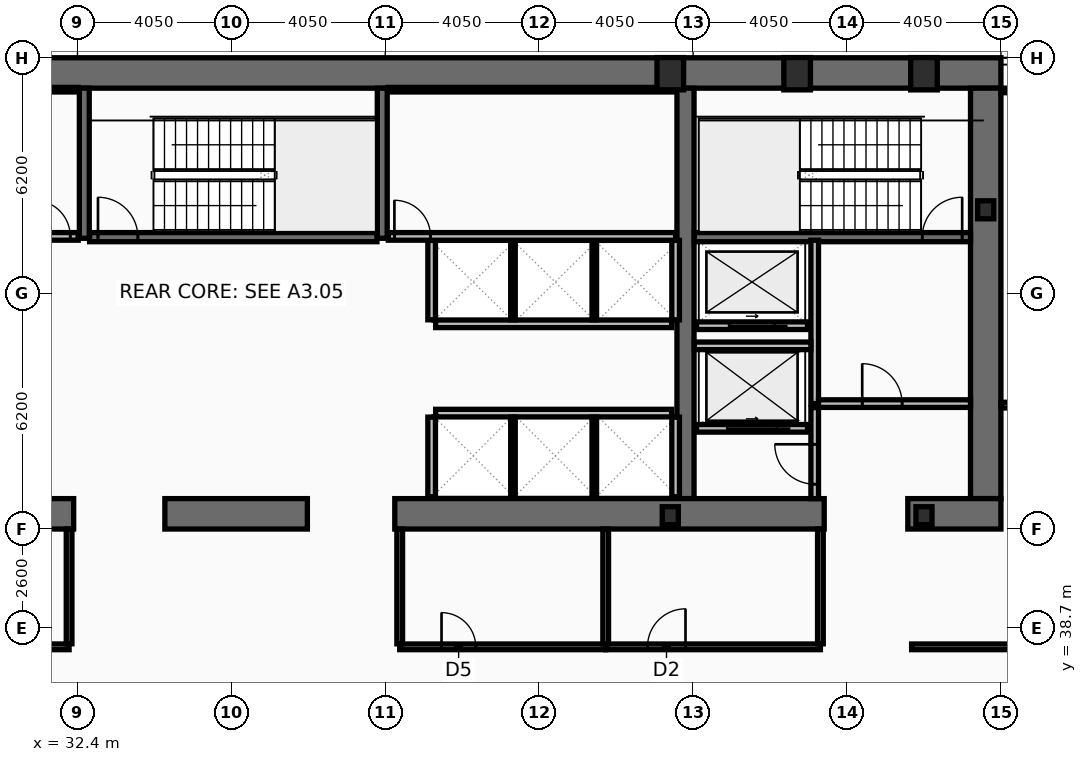
"""IFC4 building model, lengths in metres.
Left out: names, types, materials, properties, quantities, classifications, styles, units other than length and angle.
Written with IfcOpenShell. Run it as: python <this file> out.ifc"""

import sys

from ifc_helpers import new_model, si_unit, direction, frame, frame_2d, origin, origin_2d, place, context, subcontext, project, spatial, rectangle, hollow_rectangle, i_section, extrude, element, fill, save


model = new_model("IFC4")
c1 = context("Model", 3, precision=1e-05, world=origin(), true_north=direction((0.0, 1.0)))
c2 = subcontext(c1, "Body", "Model", "MODEL_VIEW")
j1 = project(units=[si_unit("LENGTHUNIT", "METRE"), si_unit("PLANEANGLEUNIT", "RADIAN")], contexts=[c1])
p1 = place(None, origin())
s1 = spatial("IfcSite", under=j1, at=p1, CompositionType="ELEMENT")
p2 = place(p1, origin())
s2 = spatial("IfcBuilding", under=s1, at=p2, CompositionType="ELEMENT")
p3 = place(p2, frame((0.0, 0.0, 81.8)))
s3 = spatial("IfcBuildingStorey", under=s2, at=p3, CompositionType="ELEMENT", Elevation=81.8)
p4 = place(p3, frame((16.2, 53.3, 0.0), z_axis=(0.0, 0.0, 1.0), x_axis=(1.0, 0.0, 0.0)))
e1 = element("IfcWall", 1, at=p4, inside=s3, PredefinedType="SHEAR", context=c2, shape_type="SweptSolid", body=[
    extrude(rectangle(XDim=40.5, YDim=0.8, at=frame_2d((20.25, 0.0))), origin(), (0.0, 0.0, 1.0), 3.78),
])
p5 = place(p3, frame((56.3, 52.9, 0.0), z_axis=(0.0, 0.0, 1.0), x_axis=(0.0, -1.0, 0.0)))
e2 = element("IfcWall", 2, at=p5, inside=s3, PredefinedType="SHEAR", context=c2, shape_type="SweptSolid", body=[
    extrude(rectangle(XDim=10.8, YDim=0.8, at=frame_2d((5.4, 0.0))), origin(), (0.0, 0.0, 1.0), 3.78),
])
p6 = place(p3, frame((48.4, 42.1, 0.0), z_axis=(0.0, 0.0, 1.0), x_axis=(0.0, 1.0, 0.0)))
e3 = element("IfcWall", 3, at=p6, inside=s3, PredefinedType="SHEAR", context=c2, shape_type="SweptSolid", body=[
    extrude(rectangle(XDim=10.8, YDim=0.45, at=frame_2d((5.4, 0.0))), origin(), (0.0, 0.0, 1.0), 3.78),
])
p7 = place(p3, frame((32.3, 41.7, 0.0), z_axis=(0.0, 0.0, 1.0), x_axis=(-1.0, 0.0, 0.0)))
e4 = element("IfcWall", 4, at=p7, inside=s3, PredefinedType="SHEAR", context=c2, shape_type="SweptSolid", body=[
    extrude(rectangle(XDim=11.45, YDim=0.8, at=frame_2d((5.725, 0.0))), origin(), (0.0, 0.0, 1.0), 3.78),
])
p8 = place(p3, frame((38.45, 41.7, 0.0), z_axis=(0.0, 0.0, 1.0), x_axis=(-1.0, 0.0, 0.0)))
e5 = element("IfcWall", 5, at=p8, inside=s3, PredefinedType="SHEAR", context=c2, shape_type="SweptSolid", body=[
    extrude(rectangle(XDim=3.75, YDim=0.8, at=frame_2d((1.875, 0.0))), origin(), (0.0, 0.0, 1.0), 3.78),
])
p9 = place(p3, frame((52.05, 41.7, 0.0), z_axis=(0.0, 0.0, 1.0), x_axis=(-1.0, 0.0, 0.0)))
e6 = element("IfcWall", 6, at=p9, inside=s3, PredefinedType="SHEAR", context=c2, shape_type="SweptSolid", body=[
    extrude(rectangle(XDim=11.3, YDim=0.8, at=frame_2d((5.65, 0.0))), origin(), (0.0, 0.0, 1.0), 3.78),
])
p10 = place(p3, frame((56.7, 41.7, 0.0), z_axis=(0.0, 0.0, 1.0), x_axis=(-1.0, 0.0, 0.0)))
e7 = element("IfcWall", 7, at=p10, inside=s3, PredefinedType="SHEAR", context=c2, shape_type="SweptSolid", body=[
    extrude(rectangle(XDim=2.45, YDim=0.8, at=frame_2d((1.225, 0.0))), origin(), (0.0, 0.0, 1.0), 3.78),
])
for number, where, z_axis, x_axis in (
    (8, (32.58, 48.95, 0.0), (0.0, 0.0, 1.0), (0.0, 1.0, 0.0)),
    (9, (40.42, 48.95, 0.0), (0.0, 0.0, 1.0), (0.0, 1.0, 0.0)),
):
    element("IfcWall", number, at=place(p3, frame(where, z_axis=z_axis, x_axis=x_axis)), inside=s3, PredefinedType="SHEAR", context=c2, shape_type="SweptSolid", body=[
        extrude(rectangle(XDim=3.95, YDim=0.26, at=frame_2d((1.975, 0.0))), origin(), (0.0, 0.0, 1.0), 3.78),
    ])
p11 = place(p3, frame((48.63, 48.98, 0.0), z_axis=(0.0, 0.0, 1.0), x_axis=(1.0, 0.0, 0.0)))
e10 = element("IfcWall", 10, at=p11, inside=s3, PredefinedType="SHEAR", context=c2, shape_type="SweptSolid", body=[
    extrude(rectangle(XDim=7.27, YDim=0.24, at=frame_2d((3.635, 0.0))), origin(), (0.0, 0.0, 1.0), 3.78),
])
p12 = place(p11, frame((6.0, 0.0, 0.0)))
e11 = element("IfcOpeningElement", 11, at=p12, cuts=e10, PredefinedType="OPENING", context=c2, shape_type="SweptSolid", body=[
    extrude(rectangle(XDim=1.05, YDim=2.15, at=frame_2d((0.525, 1.075))), frame((0.0, 0.13, 0.0), z_axis=(0.0, -1.0, 0.0), x_axis=(1.0, 0.0, 0.0)), (0.0, 0.0, 1.0), 0.26),
])
p13 = place(p3, frame((32.72, 48.98, 0.0), z_axis=(0.0, 0.0, 1.0), x_axis=(1.0, 0.0, 0.0)))
e12 = element("IfcWall", 12, at=p13, inside=s3, PredefinedType="SHEAR", context=c2, shape_type="SweptSolid", body=[
    extrude(rectangle(XDim=7.56, YDim=0.24, at=frame_2d((3.78, 0.0))), origin(), (0.0, 0.0, 1.0), 3.78),
])
p14 = place(p13, frame((0.22, 0.0, 0.0)))
e13 = element("IfcOpeningElement", 13, at=p14, cuts=e12, PredefinedType="OPENING", context=c2, shape_type="SweptSolid", body=[
    extrude(rectangle(XDim=1.05, YDim=2.15, at=frame_2d((0.525, 1.075))), frame((0.0, 0.13, 0.0), z_axis=(0.0, -1.0, 0.0), x_axis=(1.0, 0.0, 0.0)), (0.0, 0.0, 1.0), 0.26),
])
for number, where, z_axis, x_axis in (
    (14, (48.0, 53.28, 0.0), (0.0, 0.0, 1.0), (1.0, 0.0, 0.0)),
    (15, (51.337, 53.28, 0.0), (0.0, 0.0, 1.0), (1.0, 0.0, 0.0)),
    (16, (54.675, 53.28, 0.0), (0.0, 0.0, 1.0), (1.0, 0.0, 0.0)),
):
    element("IfcColumn", number, at=place(p3, frame(where, z_axis=z_axis, x_axis=x_axis)), inside=s3, PredefinedType="COLUMN", context=c2, shape_type="SweptSolid", body=[
        extrude(hollow_rectangle(XDim=0.7, YDim=0.85, WallThickness=0.05, at=origin_2d()), origin(), (0.0, 0.0, 1.0), 4.0),
    ])
for number, where, z_axis, x_axis in (
    (17, (56.3, 49.7, 0.0), (0.0, 0.0, 1.0), (1.0, 0.0, 0.0)),
    (18, (48.0, 41.65, 0.0), (0.0, 0.0, 1.0), (1.0, 0.0, 0.0)),
    (19, (54.675, 41.65, 0.0), (0.0, 0.0, 1.0), (1.0, 0.0, 0.0)),
):
    element("IfcColumn", number, at=place(p3, frame(where, z_axis=z_axis, x_axis=x_axis)), inside=s3, PredefinedType="COLUMN", context=c2, shape_type="SweptSolid", body=[
        extrude(i_section(OverallWidth=0.424, OverallDepth=0.474, WebThickness=0.048, FlangeThickness=0.077, at=origin_2d()), origin(), (0.0, 0.0, 1.0), 4.0),
    ])
p15 = place(p3, frame((51.61, 43.95, 0.0), z_axis=(0.0, 0.0, 1.0), x_axis=(-1.0, 0.0, 0.0)))
e20 = element("IfcWall", 20, at=p15, inside=s3, PredefinedType="PARTITIONING", context=c2, shape_type="SweptSolid", body=[
    extrude(rectangle(XDim=2.92, YDim=0.2, at=frame_2d((1.46, 0.0))), origin(), (0.0, 0.0, 1.0), 3.78),
])
p16 = place(p15, frame((0.81, 0.0, 0.0)))
e21 = element("IfcOpeningElement", 21, at=p16, cuts=e20, PredefinedType="OPENING", context=c2, shape_type="SweptSolid", body=[
    extrude(rectangle(XDim=1.3, YDim=2.18, at=frame_2d((0.65, 1.09))), frame((0.0, 0.11, 0.0), z_axis=(0.0, -1.0, 0.0), x_axis=(1.0, 0.0, 0.0)), (0.0, 0.0, 1.0), 0.22),
])
p17 = place(p3, frame((51.61, 46.65, 0.0), z_axis=(0.0, 0.0, 1.0), x_axis=(-1.0, 0.0, 0.0)))
e22 = element("IfcWall", 22, at=p17, inside=s3, PredefinedType="PARTITIONING", context=c2, shape_type="SweptSolid", body=[
    extrude(rectangle(XDim=2.92, YDim=0.2, at=frame_2d((1.46, 0.0))), origin(), (0.0, 0.0, 1.0), 3.78),
])
p18 = place(p17, frame((0.86, 0.0, 0.0)))
e23 = element("IfcOpeningElement", 23, at=p18, cuts=e22, PredefinedType="OPENING", context=c2, shape_type="SweptSolid", body=[
    extrude(rectangle(XDim=1.2, YDim=2.18, at=frame_2d((0.6, 1.09))), frame((0.0, 0.11, 0.0), z_axis=(0.0, -1.0, 0.0), x_axis=(1.0, 0.0, 0.0)), (0.0, 0.0, 1.0), 0.22),
])
p19 = place(p3, frame((51.8, 44.6, 0.0), z_axis=(0.0, 0.0, 1.0), x_axis=(0.0, 1.0, 0.0)))
e24 = element("IfcWall", 24, at=p19, inside=s3, PredefinedType="PARTITIONING", context=c2, shape_type="SweptSolid", body=[
    extrude(rectangle(XDim=4.3, YDim=0.2, at=frame_2d((2.15, 0.0))), origin(), (0.0, 0.0, 1.0), 3.78),
])
p20 = place(p3, frame((51.9, 44.6, 0.0), z_axis=(0.0, 0.0, 1.0), x_axis=(1.0, 0.0, 0.0)))
e25 = element("IfcWall", 25, at=p20, inside=s3, PredefinedType="PARTITIONING", context=c2, shape_type="SweptSolid", body=[
    extrude(rectangle(XDim=4.0, YDim=0.2, at=frame_2d((2.0, 0.0))), origin(), (0.0, 0.0, 1.0), 3.78),
])
p21 = place(p20, frame((1.15, 0.0, 0.0)))
e26 = element("IfcOpeningElement", 26, at=p21, cuts=e25, PredefinedType="OPENING", context=c2, shape_type="SweptSolid", body=[
    extrude(rectangle(XDim=1.05, YDim=2.15, at=frame_2d((0.525, 1.075))), frame((0.0, 0.11, 0.0), z_axis=(0.0, -1.0, 0.0), x_axis=(1.0, 0.0, 0.0)), (0.0, 0.0, 1.0), 0.22),
])
p22 = place(p3, frame((48.63, 46.12, 0.0), z_axis=(0.0, 0.0, 1.0), x_axis=(1.0, 0.0, 0.0)))
e27 = element("IfcWall", 27, at=p22, inside=s3, PredefinedType="PARTITIONING", context=c2, shape_type="SweptSolid", body=[
    extrude(rectangle(XDim=3.07, YDim=0.2, at=frame_2d((1.535, 0.0))), origin(), (0.0, 0.0, 1.0), 3.78),
])
p23 = place(p3, frame((51.8, 42.1, 0.0), z_axis=(0.0, 0.0, 1.0), x_axis=(0.0, 1.0, 0.0)))
e28 = element("IfcWall", 28, at=p23, inside=s3, PredefinedType="PARTITIONING", context=c2, shape_type="SweptSolid", body=[
    extrude(rectangle(XDim=2.395, YDim=0.2, at=frame_2d((1.198, 0.0))), origin(), (0.0, 0.0, 1.0), 3.78),
])
p24 = place(p23, frame((0.38, 0.0, 0.0)))
e29 = element("IfcOpeningElement", 29, at=p24, cuts=e28, PredefinedType="OPENING", context=c2, shape_type="SweptSolid", body=[
    extrude(rectangle(XDim=1.05, YDim=2.15, at=frame_2d((0.525, 1.075))), frame((0.0, 0.11, 0.0), z_axis=(0.0, -1.0, 0.0), x_axis=(1.0, 0.0, 0.0)), (0.0, 0.0, 1.0), 0.22),
])
p25 = place(p3, frame((41.825, 46.7, 0.0), z_axis=(0.0, 0.0, 1.0), x_axis=(1.0, 0.0, 0.0)))
e30 = element("IfcWall", 30, at=p25, inside=s3, PredefinedType="PARTITIONING", context=c2, shape_type="SweptSolid", body=[
    extrude(rectangle(XDim=6.21, YDim=0.2, at=frame_2d((3.105, 0.0))), origin(), (0.0, 0.0, 1.0), 3.78),
])
for number, where, z_axis, x_axis in (
    (31, (41.72, 46.805, 0.0), (0.0, 0.0, 1.0), (0.0, 1.0, 0.0)),
    (32, (48.14, 46.805, 0.0), (0.0, 0.0, 1.0), (0.0, 1.0, 0.0)),
):
    element("IfcWall", number, at=place(p3, frame(where, z_axis=z_axis, x_axis=x_axis)), inside=s3, PredefinedType="PARTITIONING", context=c2, shape_type="SweptSolid", body=[
        extrude(rectangle(XDim=2.09, YDim=0.2, at=frame_2d((1.045, 0.0))), origin(), (0.0, 0.0, 1.0), 3.78),
    ])
for number, where, z_axis, x_axis in (
    (33, (43.86, 46.805, 0.0), (0.0, 0.0, 1.0), (0.0, 1.0, 0.0)),
    (34, (46.0, 46.805, 0.0), (0.0, 0.0, 1.0), (0.0, 1.0, 0.0)),
):
    element("IfcWall", number, at=place(p3, frame(where, z_axis=z_axis, x_axis=x_axis)), inside=s3, PredefinedType="PARTITIONING", context=c2, shape_type="SweptSolid", body=[
        extrude(rectangle(XDim=2.09, YDim=0.12, at=frame_2d((1.045, 0.0))), origin(), (0.0, 0.0, 1.0), 3.78),
    ])
p26 = place(p3, frame((41.825, 44.35, 0.0), z_axis=(0.0, 0.0, 1.0), x_axis=(1.0, 0.0, 0.0)))
e35 = element("IfcWall", 35, at=p26, inside=s3, PredefinedType="PARTITIONING", context=c2, shape_type="SweptSolid", body=[
    extrude(rectangle(XDim=6.21, YDim=0.2, at=frame_2d((3.105, 0.0))), origin(), (0.0, 0.0, 1.0), 3.78),
])
for number, where, z_axis, x_axis in (
    (36, (41.72, 42.15, 0.0), (0.0, 0.0, 1.0), (0.0, 1.0, 0.0)),
    (37, (48.14, 42.15, 0.0), (0.0, 0.0, 1.0), (0.0, 1.0, 0.0)),
):
    element("IfcWall", number, at=place(p3, frame(where, z_axis=z_axis, x_axis=x_axis)), inside=s3, PredefinedType="PARTITIONING", context=c2, shape_type="SweptSolid", body=[
        extrude(rectangle(XDim=2.095, YDim=0.2, at=frame_2d((1.048, 0.0))), origin(), (0.0, 0.0, 1.0), 3.78),
    ])
for number, where, z_axis, x_axis in (
    (38, (43.86, 42.15, 0.0), (0.0, 0.0, 1.0), (0.0, 1.0, 0.0)),
    (39, (46.0, 42.15, 0.0), (0.0, 0.0, 1.0), (0.0, 1.0, 0.0)),
):
    element("IfcWall", number, at=place(p3, frame(where, z_axis=z_axis, x_axis=x_axis)), inside=s3, PredefinedType="PARTITIONING", context=c2, shape_type="SweptSolid", body=[
        extrude(rectangle(XDim=2.095, YDim=0.12, at=frame_2d((1.048, 0.0))), origin(), (0.0, 0.0, 1.0), 3.78),
    ])
p27 = place(p3, frame((24.7, 52.86, 0.0), z_axis=(0.0, 0.0, 1.0), x_axis=(1.0, 0.0, 0.0)))
e40 = element("IfcWall", 40, at=p27, inside=s3, PredefinedType="PARTITIONING", context=c2, shape_type="SweptSolid", body=[
    extrude(rectangle(XDim=7.72, YDim=0.12, at=frame_2d((3.86, 0.0))), origin(), (0.0, 0.0, 1.0), 3.78),
])
p28 = place(p3, frame((24.7, 49.0, 0.0), z_axis=(0.0, 0.0, 1.0), x_axis=(1.0, 0.0, 0.0)))
e41 = element("IfcWall", 41, at=p28, inside=s3, PredefinedType="PARTITIONING", context=c2, shape_type="SweptSolid", body=[
    extrude(rectangle(XDim=7.72, YDim=0.2, at=frame_2d((3.86, 0.0))), origin(), (0.0, 0.0, 1.0), 3.78),
])
p29 = place(p28, frame((6.56, 0.0, 0.0)))
e42 = element("IfcOpeningElement", 42, at=p29, cuts=e41, PredefinedType="OPENING", context=c2, shape_type="SweptSolid", body=[
    extrude(rectangle(XDim=0.95, YDim=2.1, at=frame_2d((0.475, 1.05))), frame((0.0, 0.11, 0.0), z_axis=(0.0, -1.0, 0.0), x_axis=(1.0, 0.0, 0.0)), (0.0, 0.0, 1.0), 0.22),
])
p30 = place(p3, frame((40.58, 52.86, 0.0), z_axis=(0.0, 0.0, 1.0), x_axis=(1.0, 0.0, 0.0)))
e43 = element("IfcWall", 43, at=p30, inside=s3, PredefinedType="PARTITIONING", context=c2, shape_type="SweptSolid", body=[
    extrude(rectangle(XDim=7.56, YDim=0.12, at=frame_2d((3.78, 0.0))), origin(), (0.0, 0.0, 1.0), 3.78),
])
p31 = place(p3, frame((40.58, 49.0, 0.0), z_axis=(0.0, 0.0, 1.0), x_axis=(1.0, 0.0, 0.0)))
e44 = element("IfcWall", 44, at=p31, inside=s3, PredefinedType="PARTITIONING", context=c2, shape_type="SweptSolid", body=[
    extrude(rectangle(XDim=7.56, YDim=0.2, at=frame_2d((3.78, 0.0))), origin(), (0.0, 0.0, 1.0), 3.78),
])
p32 = place(p31, frame((0.16, 0.0, 0.0)))
e45 = element("IfcOpeningElement", 45, at=p32, cuts=e44, PredefinedType="OPENING", context=c2, shape_type="SweptSolid", body=[
    extrude(rectangle(XDim=0.95, YDim=2.1, at=frame_2d((0.475, 1.05))), frame((0.0, 0.11, 0.0), z_axis=(0.0, -1.0, 0.0), x_axis=(1.0, 0.0, 0.0)), (0.0, 0.0, 1.0), 0.22),
])
p33 = place(p3, frame((28.4, 38.2, 0.0), z_axis=(0.0, 0.0, 1.0), x_axis=(1.0, 0.0, 0.0)))
e46 = element("IfcWall", 46, at=p33, inside=s3, PredefinedType="PARTITIONING", context=c2, shape_type="SweptSolid", body=[
    extrude(rectangle(XDim=3.78, YDim=0.15, at=frame_2d((1.89, 0.0))), origin(), (0.0, 0.0, 1.0), 2.97),
])
p34 = place(p33, frame((0.7, 0.0, 0.0)))
e47 = element("IfcOpeningElement", 47, at=p34, cuts=e46, PredefinedType="OPENING", context=c2, shape_type="SweptSolid", body=[
    extrude(rectangle(XDim=0.95, YDim=2.05, at=frame_2d((0.475, 1.025))), frame((0.0, 0.085, 0.0), z_axis=(0.0, -1.0, 0.0), x_axis=(1.0, 0.0, 0.0)), (0.0, 0.0, 1.0), 0.17),
])
p35 = place(p3, frame((32.18, 38.28, 0.0), z_axis=(0.0, 0.0, 1.0), x_axis=(0.0, 1.0, 0.0)))
e48 = element("IfcWall", 48, at=p35, inside=s3, PredefinedType="PARTITIONING", context=c2, shape_type="SweptSolid", body=[
    extrude(rectangle(XDim=3.02, YDim=0.15, at=frame_2d((1.51, 0.0))), origin(), (0.0, 0.0, 1.0), 3.78),
])
p36 = place(p3, frame((40.88, 38.2, 0.0), z_axis=(0.0, 0.0, 1.0), x_axis=(1.0, 0.0, 0.0)))
e49 = element("IfcWall", 49, at=p36, inside=s3, PredefinedType="PARTITIONING", context=c2, shape_type="SweptSolid", body=[
    extrude(rectangle(XDim=5.42, YDim=0.15, at=frame_2d((2.71, 0.0))), origin(), (0.0, 0.0, 1.0), 2.97),
])
p37 = place(p36, frame((1.1, 0.0, 0.0)))
e50 = element("IfcOpeningElement", 50, at=p37, cuts=e49, PredefinedType="OPENING", context=c2, shape_type="SweptSolid", body=[
    extrude(rectangle(XDim=0.9, YDim=2.05, at=frame_2d((0.45, 1.025))), frame((0.0, 0.085, 0.0), z_axis=(0.0, -1.0, 0.0), x_axis=(1.0, 0.0, 0.0)), (0.0, 0.0, 1.0), 0.17),
])
p38 = place(p3, frame((46.3, 38.2, 0.0), z_axis=(0.0, 0.0, 1.0), x_axis=(1.0, 0.0, 0.0)))
e51 = element("IfcWall", 51, at=p38, inside=s3, PredefinedType="PARTITIONING", context=c2, shape_type="SweptSolid", body=[
    extrude(rectangle(XDim=5.65, YDim=0.15, at=frame_2d((2.825, 0.0))), origin(), (0.0, 0.0, 1.0), 2.97),
])
p39 = place(p38, frame((1.1, 0.0, 0.0)))
e52 = element("IfcOpeningElement", 52, at=p39, cuts=e51, PredefinedType="OPENING", context=c2, shape_type="SweptSolid", body=[
    extrude(rectangle(XDim=1.0, YDim=2.05, at=frame_2d((0.5, 1.025))), frame((0.0, 0.085, 0.0), z_axis=(0.0, -1.0, 0.0), x_axis=(1.0, 0.0, 0.0)), (0.0, 0.0, 1.0), 0.17),
])
for number, where, z_axis, x_axis in (
    (53, (40.88, 38.28, 0.0), (0.0, 0.0, 1.0), (0.0, 1.0, 0.0)),
    (54, (46.3, 38.28, 0.0), (0.0, 0.0, 1.0), (0.0, 1.0, 0.0)),
    (55, (51.95, 38.28, 0.0), (0.0, 0.0, 1.0), (0.0, 1.0, 0.0)),
):
    element("IfcWall", number, at=place(p3, frame(where, z_axis=z_axis, x_axis=x_axis)), inside=s3, PredefinedType="PARTITIONING", context=c2, shape_type="SweptSolid", body=[
        extrude(rectangle(XDim=3.02, YDim=0.15, at=frame_2d((1.51, 0.0))), origin(), (0.0, 0.0, 1.0), 3.78),
    ])
p40 = place(p3, frame((54.35, 38.2, 0.0), z_axis=(0.0, 0.0, 1.0), x_axis=(1.0, 0.0, 0.0)))
e56 = element("IfcWall", 56, at=p40, inside=s3, PredefinedType="PARTITIONING", context=c2, shape_type="SweptSolid", body=[
    extrude(rectangle(XDim=14.52, YDim=0.15, at=frame_2d((7.26, 0.0))), origin(), (0.0, 0.0, 1.0), 2.97),
])
p41 = place(p40, frame((3.25, 0.0, 0.0)))
e57 = element("IfcOpeningElement", 57, at=p41, cuts=e56, PredefinedType="OPENING", context=c2, shape_type="SweptSolid", body=[
    extrude(rectangle(XDim=0.95, YDim=2.05, at=frame_2d((0.475, 1.025))), frame((0.0, 0.085, 0.0), z_axis=(0.0, -1.0, 0.0), x_axis=(1.0, 0.0, 0.0)), (0.0, 0.0, 1.0), 0.17),
])
p42 = place(p3, frame((56.7, 44.56, 0.0), z_axis=(0.0, 0.0, 1.0), x_axis=(1.0, 0.0, 0.0)))
e58 = element("IfcWall", 58, at=p42, inside=s3, PredefinedType="PARTITIONING", context=c2, shape_type="SweptSolid", body=[
    extrude(rectangle(XDim=12.105, YDim=0.15, at=frame_2d((6.052, 0.0))), origin(), (0.0, 0.0, 1.0), 3.12),
])
p43 = place(p42, frame((0.9, 0.0, 0.0)))
e59 = element("IfcOpeningElement", 59, at=p43, cuts=e58, PredefinedType="OPENING", context=c2, shape_type="SweptSolid", body=[
    extrude(rectangle(XDim=0.9, YDim=2.05, at=frame_2d((0.45, 1.025))), frame((0.0, 0.085, 0.0), z_axis=(0.0, -1.0, 0.0), x_axis=(1.0, 0.0, 0.0)), (0.0, 0.0, 1.0), 0.17),
])
p44 = place(p3, frame((56.7, 52.84, 0.0), z_axis=(0.0, 0.0, 1.0), x_axis=(1.0, 0.0, 0.0)))
e60 = element("IfcWall", 60, at=p44, inside=s3, PredefinedType="PARTITIONING", context=c2, shape_type="SweptSolid", body=[
    extrude(rectangle(XDim=12.105, YDim=0.12, at=frame_2d((6.052, 0.0))), origin(), (0.0, 0.0, 1.0), 3.78),
])
p45 = place(p12, origin())
e61 = element("IfcDoor", 61, at=p45, inside=s3, OperationType="SINGLE_SWING_RIGHT", PredefinedType="DOOR", context=c2, shape_type="SweptSolid", body=[
    extrude(rectangle(XDim=1.05, YDim=2.15, at=frame_2d((0.525, 1.075))), frame((0.0, 0.025, 0.0), z_axis=(0.0, -1.0, 0.0), x_axis=(1.0, 0.0, 0.0)), (0.0, 0.0, 1.0), 0.05),
])
fill(e11, e61)
p46 = place(p14, origin())
e62 = element("IfcDoor", 62, at=p46, inside=s3, OperationType="SINGLE_SWING_LEFT", PredefinedType="DOOR", context=c2, shape_type="SweptSolid", body=[
    extrude(rectangle(XDim=1.05, YDim=2.15, at=frame_2d((0.525, 1.075))), frame((0.0, 0.025, 0.0), z_axis=(0.0, -1.0, 0.0), x_axis=(1.0, 0.0, 0.0)), (0.0, 0.0, 1.0), 0.05),
])
fill(e13, e62)
p47 = place(p16, origin())
e63 = element("IfcDoor", 63, at=p47, inside=s3, OperationType="SLIDING_TO_LEFT", PredefinedType="DOOR", context=c2, shape_type="SweptSolid", body=[
    extrude(rectangle(XDim=1.3, YDim=2.18, at=frame_2d((0.65, 1.09))), frame((0.0, 0.025, 0.0), z_axis=(0.0, -1.0, 0.0), x_axis=(1.0, 0.0, 0.0)), (0.0, 0.0, 1.0), 0.05),
])
fill(e21, e63)
p48 = place(p18, origin())
e64 = element("IfcDoor", 64, at=p48, inside=s3, OperationType="SLIDING_TO_LEFT", PredefinedType="DOOR", context=c2, shape_type="SweptSolid", body=[
    extrude(rectangle(XDim=1.2, YDim=2.18, at=frame_2d((0.6, 1.09))), frame((0.0, 0.025, 0.0), z_axis=(0.0, -1.0, 0.0), x_axis=(1.0, 0.0, 0.0)), (0.0, 0.0, 1.0), 0.05),
])
fill(e23, e64)
p49 = place(p21, origin())
e65 = element("IfcDoor", 65, at=p49, inside=s3, OperationType="SINGLE_SWING_LEFT", PredefinedType="DOOR", context=c2, shape_type="SweptSolid", body=[
    extrude(rectangle(XDim=1.05, YDim=2.15, at=frame_2d((0.525, 1.075))), frame((0.0, 0.025, 0.0), z_axis=(0.0, -1.0, 0.0), x_axis=(1.0, 0.0, 0.0)), (0.0, 0.0, 1.0), 0.05),
])
fill(e26, e65)
p50 = place(p24, origin())
e66 = element("IfcDoor", 66, at=p50, inside=s3, OperationType="SINGLE_SWING_RIGHT", PredefinedType="DOOR", context=c2, shape_type="SweptSolid", body=[
    extrude(rectangle(XDim=1.05, YDim=2.15, at=frame_2d((0.525, 1.075))), frame((0.0, 0.025, 0.0), z_axis=(0.0, -1.0, 0.0), x_axis=(1.0, 0.0, 0.0)), (0.0, 0.0, 1.0), 0.05),
])
fill(e29, e66)
p51 = place(p29, origin())
e67 = element("IfcDoor", 67, at=p51, inside=s3, OperationType="SINGLE_SWING_LEFT", PredefinedType="DOOR", context=c2, shape_type="SweptSolid", body=[
    extrude(rectangle(XDim=0.95, YDim=2.1, at=frame_2d((0.475, 1.05))), frame((0.0, 0.025, 0.0), z_axis=(0.0, -1.0, 0.0), x_axis=(1.0, 0.0, 0.0)), (0.0, 0.0, 1.0), 0.05),
])
fill(e42, e67)
p52 = place(p32, origin())
e68 = element("IfcDoor", 68, at=p52, inside=s3, OperationType="SINGLE_SWING_LEFT", PredefinedType="DOOR", context=c2, shape_type="SweptSolid", body=[
    extrude(rectangle(XDim=0.95, YDim=2.1, at=frame_2d((0.475, 1.05))), frame((0.0, 0.025, 0.0), z_axis=(0.0, -1.0, 0.0), x_axis=(1.0, 0.0, 0.0)), (0.0, 0.0, 1.0), 0.05),
])
fill(e45, e68)
p53 = place(p37, origin())
e69 = element("IfcDoor", 69, at=p53, inside=s3, OperationType="SINGLE_SWING_LEFT", PredefinedType="DOOR", context=c2, shape_type="SweptSolid", body=[
    extrude(rectangle(XDim=0.9, YDim=2.05, at=frame_2d((0.45, 1.025))), frame((0.0, 0.025, 0.0), z_axis=(0.0, -1.0, 0.0), x_axis=(1.0, 0.0, 0.0)), (0.0, 0.0, 1.0), 0.05),
])
fill(e50, e69)
p54 = place(p39, origin())
e70 = element("IfcDoor", 70, at=p54, inside=s3, OperationType="SINGLE_SWING_RIGHT", PredefinedType="DOOR", context=c2, shape_type="SweptSolid", body=[
    extrude(rectangle(XDim=1.0, YDim=2.05, at=frame_2d((0.5, 1.025))), frame((0.0, 0.025, 0.0), z_axis=(0.0, -1.0, 0.0), x_axis=(1.0, 0.0, 0.0)), (0.0, 0.0, 1.0), 0.05),
])
fill(e52, e70)
save(model, sys.argv[1])
